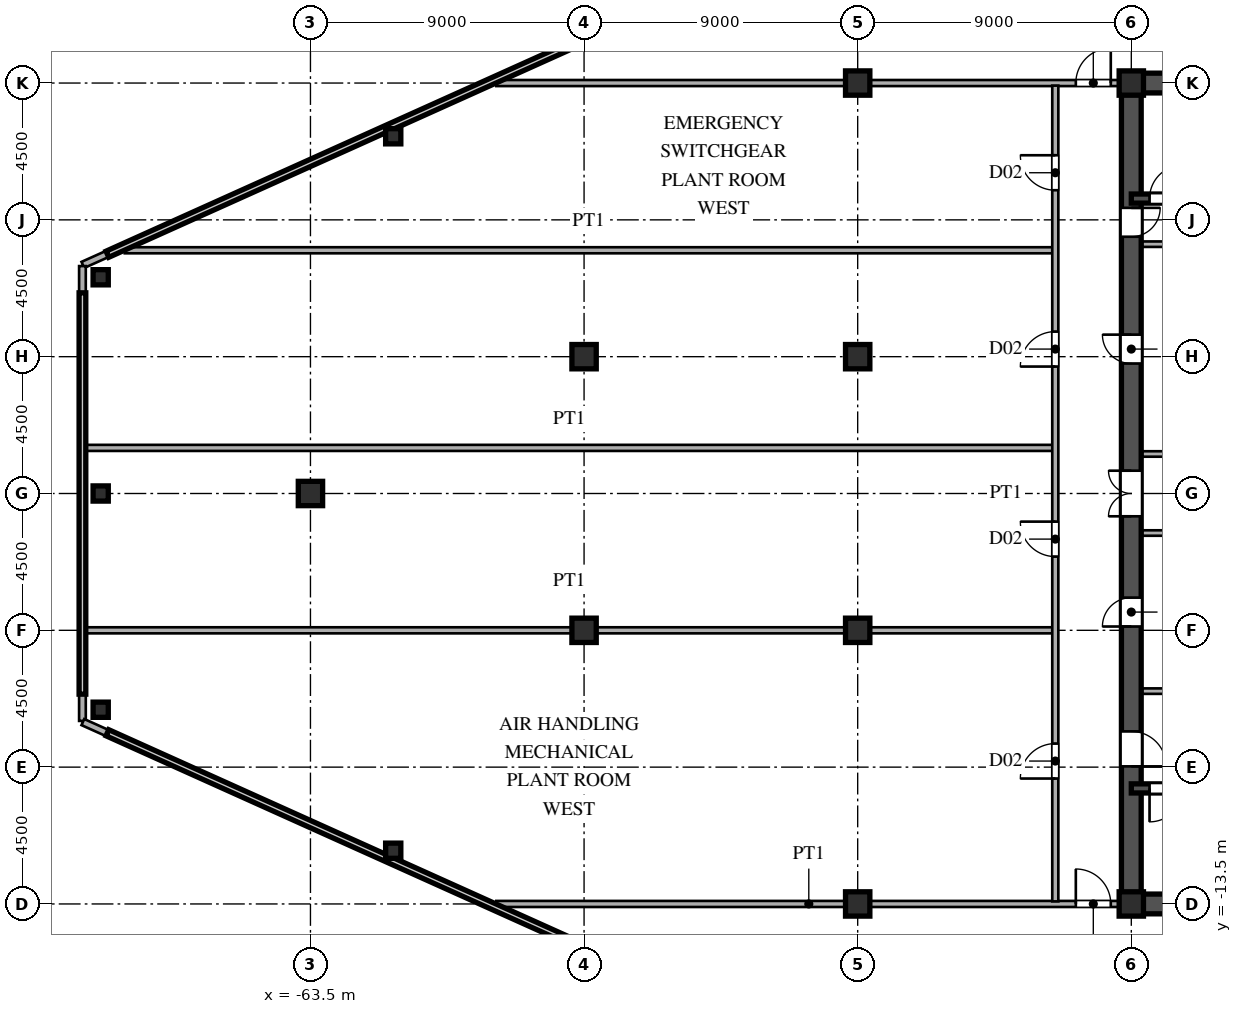
"""IFC4 building model, lengths in metres.
Left out: names, types, materials, properties, quantities, classifications, styles, units other than length and angle.
Written with IfcOpenShell. Run it as: python <this file> out.ifc"""

import sys

from ifc_helpers import new_model, si_unit, direction, frame, frame_2d, origin, origin_2d, place, context, subcontext, project, spatial, rectangle, hollow_rectangle, i_section, extrude, source, transform, mapped, element, fill, save


model = new_model("IFC4")
c1 = context("Model", 3, precision=1e-05, world=origin(), true_north=direction((0.0, 1.0)))
c2 = subcontext(c1, "Body", "Model", "MODEL_VIEW")
j1 = project(units=[si_unit("LENGTHUNIT", "METRE"), si_unit("PLANEANGLEUNIT", "RADIAN")], contexts=[c1])
p1 = place(None, origin())
s1 = spatial("IfcSite", under=j1, at=p1, CompositionType="ELEMENT")
p2 = place(p1, origin())
s2 = spatial("IfcBuilding", under=s1, at=p2, CompositionType="ELEMENT")
p3 = place(p2, frame((0.0, 0.0, 87.3)))
s3 = spatial("IfcBuildingStorey", under=s2, at=p3, CompositionType="ELEMENT", Elevation=87.3)
m1 = source(origin(), c2, "Body", "SweptSolid", [
    extrude(i_section(OverallWidth=0.8, OverallDepth=0.8, WebThickness=0.032, FlangeThickness=0.05, at=origin_2d()), origin(), (0.0, 0.0, 1.0), 5.1),
])
for number, where, z_axis, x_axis in (
    (1, (-36.5, -13.5, 0.0), (0.0, 0.0, 1.0), (1.0, 0.0, 0.0)),
    (2, (-36.5, 13.5, 0.0), (0.0, 0.0, 1.0), (1.0, 0.0, 0.0)),
    (3, (-45.5, -13.5, 0.0), (0.0, 0.0, 1.0), (1.0, 0.0, 0.0)),
    (4, (-45.5, -4.5, 0.0), (0.0, 0.0, 1.0), (1.0, 0.0, 0.0)),
    (5, (-45.5, 4.5, 0.0), (0.0, 0.0, 1.0), (1.0, 0.0, 0.0)),
    (6, (-45.5, 13.5, 0.0), (0.0, 0.0, 1.0), (1.0, 0.0, 0.0)),
    (7, (-54.5, -4.5, 0.0), (0.0, 0.0, 1.0), (1.0, 0.0, 0.0)),
    (8, (-54.5, 4.5, 0.0), (0.0, 0.0, 1.0), (1.0, 0.0, 0.0)),
    (9, (-63.5, 0.0, 0.0), (0.0, 0.0, 1.0), (1.0, 0.0, 0.0)),
):
    element("IfcColumn", number, at=place(p3, frame(where, z_axis=z_axis, x_axis=x_axis)), inside=s3, PredefinedType="COLUMN", context=c2, shape_type="MappedRepresentation", body=[
        mapped(m1, transform((0.0, 0.0, 0.0), scale=1.0)),
    ])
m2 = source(origin(), c2, "Body", "SweptSolid", [
    extrude(hollow_rectangle(XDim=0.5, YDim=0.5, WallThickness=0.02, at=origin_2d()), origin(), (0.0, 0.0, 1.0), 5.1),
])
for number, where, z_axis, x_axis in (
    (10, (-70.4, 7.112, 0.0), (0.0, 0.0, 1.0), (1.0, 0.0, 0.0)),
    (11, (-70.4, -7.112, 0.0), (0.0, 0.0, 1.0), (1.0, 0.0, 0.0)),
    (12, (-60.778, -11.749, 0.0), (0.0, 0.0, 1.0), (1.0, 0.0, 0.0)),
    (13, (-60.778, 11.749, 0.0), (0.0, 0.0, 1.0), (1.0, 0.0, 0.0)),
    (14, (-70.4, 0.0, 0.0), (0.0, 0.0, 1.0), (1.0, 0.0, 0.0)),
):
    element("IfcColumn", number, at=place(p3, frame(where, z_axis=z_axis, x_axis=x_axis)), inside=s3, PredefinedType="COLUMN", context=c2, shape_type="MappedRepresentation", body=[
        mapped(m2, transform((0.0, 0.0, 0.0), scale=1.0)),
    ])
p4 = place(p3, frame((-31.018, 25.492, 0.0), z_axis=(0.0, 0.0, 1.0), x_axis=(-0.911922547569, -0.410362360889, 0.0)))
e15 = element("IfcWall", 15, at=p4, inside=s3, PredefinedType="PARAPET", context=c2, shape_type="SweptSolid", body=[
    extrude(rectangle(XDim=43.823, YDim=0.22, at=frame_2d((21.912, 0.0))), origin(), (0.0, 0.0, 1.0), 1.25),
])
p5 = place(p3, frame((-71.0, 7.48, 0.0), z_axis=(0.0, 0.0, 1.0), x_axis=(0.0, -1.0, 0.0)))
e16 = element("IfcWall", 16, at=p5, inside=s3, PredefinedType="PARAPET", context=c2, shape_type="SweptSolid", body=[
    extrude(rectangle(XDim=14.96, YDim=0.22, at=frame_2d((7.48, 0.0))), origin(), (0.0, 0.0, 1.0), 1.25),
])
p6 = place(p3, frame((-70.982, -7.508, 0.0), z_axis=(0.0, 0.0, 1.0), x_axis=(0.911922547569, -0.410362360889, 0.0)))
e17 = element("IfcWall", 17, at=p6, inside=s3, PredefinedType="PARAPET", context=c2, shape_type="SweptSolid", body=[
    extrude(rectangle(XDim=43.823, YDim=0.22, at=frame_2d((21.912, 0.0))), origin(), (0.0, 0.0, 1.0), 1.25),
])
for number, where, z_axis, x_axis in (
    (18, (-36.5, -13.5, 0.0), (0.0, 0.0, 1.0), (1.0, 0.0, 0.0)),
    (19, (-36.5, 13.5, 0.0), (0.0, 0.0, 1.0), (1.0, 0.0, 0.0)),
):
    element("IfcWall", number, at=place(p3, frame(where, z_axis=z_axis, x_axis=x_axis)), inside=s3, PredefinedType="SHEAR", context=c2, shape_type="SweptSolid", body=[
        extrude(rectangle(XDim=9.0, YDim=0.65, at=frame_2d((4.5, 0.0))), origin(), (0.0, 0.0, 1.0), 4.88),
    ])
p7 = place(p3, frame((-36.5, -13.65, 0.0), z_axis=(0.0, 0.0, 1.0), x_axis=(0.0, 1.0, 0.0)))
e20 = element("IfcWall", 20, at=p7, inside=s3, PredefinedType="SHEAR", context=c2, shape_type="SweptSolid", body=[
    extrude(rectangle(XDim=7.15, YDim=0.65, at=frame_2d((3.575, 0.0))), origin(), (0.0, 0.0, 1.0), 4.88),
])
p8 = place(p7, frame((4.675, 0.0, 0.0)))
e21 = element("IfcOpeningElement", 21, at=p8, cuts=e20, PredefinedType="OPENING", context=c2, shape_type="SweptSolid", body=[
    extrude(rectangle(XDim=1.15, YDim=2.2, at=frame_2d((0.575, 1.1))), frame((0.0, 0.335, 0.0), z_axis=(0.0, -1.0, 0.0), x_axis=(1.0, 0.0, 0.0)), (0.0, 0.0, 1.0), 0.67),
])
p9 = place(p3, frame((-36.5, -1.3, 0.0), z_axis=(0.0, 0.0, 1.0), x_axis=(0.0, 1.0, 0.0)))
e22 = element("IfcWall", 22, at=p9, inside=s3, PredefinedType="SHEAR", context=c2, shape_type="SweptSolid", body=[
    extrude(rectangle(XDim=2.6, YDim=0.65, at=frame_2d((1.3, 0.0))), origin(), (0.0, 0.0, 1.0), 4.88),
])
p10 = place(p9, frame((0.55, 0.0, 0.0)))
e23 = element("IfcOpeningElement", 23, at=p10, cuts=e22, PredefinedType="OPENING", context=c2, shape_type="SweptSolid", body=[
    extrude(rectangle(XDim=1.5, YDim=2.3, at=frame_2d((0.75, 1.15))), frame((0.0, 0.335, 0.0), z_axis=(0.0, -1.0, 0.0), x_axis=(1.0, 0.0, 0.0)), (0.0, 0.0, 1.0), 0.67),
])
p11 = place(p3, frame((-36.5, 8.2, 0.0), z_axis=(0.0, 0.0, 1.0), x_axis=(0.0, 1.0, 0.0)))
e24 = element("IfcWall", 24, at=p11, inside=s3, PredefinedType="SHEAR", context=c2, shape_type="SweptSolid", body=[
    extrude(rectangle(XDim=5.45, YDim=0.65, at=frame_2d((2.725, 0.0))), origin(), (0.0, 0.0, 1.0), 4.88),
])
p12 = place(p11, frame((0.245, 0.0, 0.0)))
e25 = element("IfcOpeningElement", 25, at=p12, cuts=e24, PredefinedType="OPENING", context=c2, shape_type="SweptSolid", body=[
    extrude(rectangle(XDim=0.95, YDim=2.15, at=frame_2d((0.475, 1.075))), frame((0.0, 0.335, 0.0), z_axis=(0.0, -1.0, 0.0), x_axis=(1.0, 0.0, 0.0)), (0.0, 0.0, 1.0), 0.67),
])
p13 = place(p3, frame((-36.5, -6.5, 0.0), z_axis=(0.0, 0.0, 1.0), x_axis=(0.0, 1.0, 0.0)))
e26 = element("IfcWall", 26, at=p13, inside=s3, PredefinedType="SHEAR", context=c2, shape_type="SweptSolid", body=[
    extrude(rectangle(XDim=5.2, YDim=0.65, at=frame_2d((2.6, 0.0))), origin(), (0.0, 0.0, 1.0), 4.88),
])
p14 = place(p13, frame((2.125, 0.0, 0.0)))
e27 = element("IfcOpeningElement", 27, at=p14, cuts=e26, PredefinedType="OPENING", context=c2, shape_type="SweptSolid", body=[
    extrude(rectangle(XDim=0.95, YDim=2.15, at=frame_2d((0.475, 1.075))), frame((0.0, 0.335, 0.0), z_axis=(0.0, -1.0, 0.0), x_axis=(1.0, 0.0, 0.0)), (0.0, 0.0, 1.0), 0.67),
])
p15 = place(p3, frame((-36.5, 1.3, 0.0), z_axis=(0.0, 0.0, 1.0), x_axis=(0.0, 1.0, 0.0)))
e28 = element("IfcWall", 28, at=p15, inside=s3, PredefinedType="SHEAR", context=c2, shape_type="SweptSolid", body=[
    extrude(rectangle(XDim=6.9, YDim=0.65, at=frame_2d((3.45, 0.0))), origin(), (0.0, 0.0, 1.0), 4.88),
])
p16 = place(p15, frame((2.975, 0.0, 0.0)))
e29 = element("IfcOpeningElement", 29, at=p16, cuts=e28, PredefinedType="OPENING", context=c2, shape_type="SweptSolid", body=[
    extrude(rectangle(XDim=0.95, YDim=2.15, at=frame_2d((0.475, 1.075))), frame((0.0, 0.335, 0.0), z_axis=(0.0, -1.0, 0.0), x_axis=(1.0, 0.0, 0.0)), (0.0, 0.0, 1.0), 0.67),
])
p17 = place(p3, frame((-36.5, -9.7, 0.0), z_axis=(0.0, 0.0, 1.0), x_axis=(1.0, 0.0, 0.0)))
e30 = element("IfcWall", 30, at=p17, inside=s3, PredefinedType="SHEAR", context=c2, shape_type="SweptSolid", body=[
    extrude(rectangle(XDim=9.0, YDim=0.3, at=frame_2d((4.5, 0.0))), origin(), (0.0, 0.0, 1.0), 4.88),
])
p18 = place(p17, frame((0.6, 0.0, 0.0)))
e31 = element("IfcOpeningElement", 31, at=p18, cuts=e30, PredefinedType="OPENING", context=c2, shape_type="SweptSolid", body=[
    extrude(rectangle(XDim=1.1, YDim=2.2, at=frame_2d((0.55, 1.1))), frame((0.0, 0.16, 0.0), z_axis=(0.0, -1.0, 0.0), x_axis=(1.0, 0.0, 0.0)), (0.0, 0.0, 1.0), 0.32),
])
p19 = place(p3, frame((-36.5, 9.7, 0.0), z_axis=(0.0, 0.0, 1.0), x_axis=(1.0, 0.0, 0.0)))
e32 = element("IfcWall", 32, at=p19, inside=s3, PredefinedType="SHEAR", context=c2, shape_type="SweptSolid", body=[
    extrude(rectangle(XDim=9.0, YDim=0.3, at=frame_2d((4.5, 0.0))), origin(), (0.0, 0.0, 1.0), 4.88),
])
p20 = place(p19, frame((0.6, 0.0, 0.0)))
e33 = element("IfcOpeningElement", 33, at=p20, cuts=e32, PredefinedType="OPENING", context=c2, shape_type="SweptSolid", body=[
    extrude(rectangle(XDim=1.1, YDim=2.2, at=frame_2d((0.55, 1.1))), frame((0.0, 0.16, 0.0), z_axis=(0.0, -1.0, 0.0), x_axis=(1.0, 0.0, 0.0)), (0.0, 0.0, 1.0), 0.32),
])
for number, where, z_axis, x_axis in (
    (34, (-36.15, -6.5, 0.0), (0.0, 0.0, 1.0), (1.0, 0.0, 0.0)),
    (35, (-36.15, 8.2, 0.0), (0.0, 0.0, 1.0), (1.0, 0.0, 0.0)),
):
    element("IfcWall", number, at=place(p3, frame(where, z_axis=z_axis, x_axis=x_axis)), inside=s3, PredefinedType="PARTITIONING", context=c2, shape_type="SweptSolid", body=[
        extrude(rectangle(XDim=5.7, YDim=0.18, at=frame_2d((2.85, 0.0))), origin(), (0.0, 0.0, 1.0), 4.88),
    ])
for number, where, z_axis, x_axis in (
    (36, (-36.15, -1.3, 0.0), (0.0, 0.0, 1.0), (1.0, 0.0, 0.0)),
    (37, (-36.15, 1.3, 0.0), (0.0, 0.0, 1.0), (1.0, 0.0, 0.0)),
):
    element("IfcWall", number, at=place(p3, frame(where, z_axis=z_axis, x_axis=x_axis)), inside=s3, PredefinedType="PARTITIONING", context=c2, shape_type="SweptSolid", body=[
        extrude(rectangle(XDim=2.95, YDim=0.18, at=frame_2d((1.475, 0.0))), origin(), (0.0, 0.0, 1.0), 4.88),
    ])
p21 = place(p3, frame((-57.386, -13.5, 0.0), z_axis=(0.0, 0.0, 1.0), x_axis=(1.0, 0.0, 0.0)))
e38 = element("IfcWall", 38, at=p21, inside=s3, PredefinedType="PARTITIONING", context=c2, shape_type="SweptSolid", body=[
    extrude(rectangle(XDim=11.866, YDim=0.2, at=frame_2d((5.933, 0.0))), origin(), (0.0, 0.0, 1.0), 4.88),
])
p22 = place(p3, frame((-45.52, -13.5, 0.0), z_axis=(0.0, 0.0, 1.0), x_axis=(1.0, 0.0, 0.0)))
e39 = element("IfcWall", 39, at=p22, inside=s3, PredefinedType="PARTITIONING", context=c2, shape_type="SweptSolid", body=[
    extrude(rectangle(XDim=8.69, YDim=0.2, at=frame_2d((4.345, 0.0))), origin(), (0.0, 0.0, 1.0), 4.18),
])
p23 = place(p22, frame((7.195, 0.0, 0.0)))
e40 = element("IfcOpeningElement", 40, at=p23, cuts=e39, PredefinedType="OPENING", context=c2, shape_type="SweptSolid", body=[
    extrude(rectangle(XDim=1.15, YDim=2.2, at=frame_2d((0.575, 1.1))), frame((0.0, 0.11, 0.0), z_axis=(0.0, -1.0, 0.0), x_axis=(1.0, 0.0, 0.0)), (0.0, 0.0, 1.0), 0.22),
])
p24 = place(p3, frame((-70.885, -4.5, 0.0), z_axis=(0.0, 0.0, 1.0), x_axis=(1.0, 0.0, 0.0)))
e41 = element("IfcWall", 41, at=p24, inside=s3, PredefinedType="PARTITIONING", context=c2, shape_type="SweptSolid", body=[
    extrude(rectangle(XDim=16.365, YDim=0.2, at=frame_2d((8.183, 0.0))), origin(), (0.0, 0.0, 1.0), 4.88),
])
p25 = place(p3, frame((-54.52, -4.5, 0.0), z_axis=(0.0, 0.0, 1.0), x_axis=(1.0, 0.0, 0.0)))
e42 = element("IfcWall", 42, at=p25, inside=s3, PredefinedType="PARTITIONING", context=c2, shape_type="SweptSolid", body=[
    extrude(rectangle(XDim=15.435, YDim=0.2, at=frame_2d((7.718, 0.0))), origin(), (0.0, 0.0, 1.0), 4.18),
])
p26 = place(p3, frame((-70.885, 1.5, 0.0), z_axis=(0.0, 0.0, 1.0), x_axis=(1.0, 0.0, 0.0)))
e43 = element("IfcWall", 43, at=p26, inside=s3, PredefinedType="PARTITIONING", context=c2, shape_type="SweptSolid", body=[
    extrude(rectangle(XDim=31.8, YDim=0.2, at=frame_2d((15.9, 0.0))), origin(), (0.0, 0.0, 1.0), 4.88),
])
p27 = place(p3, frame((-69.609, 8.0, 0.0), z_axis=(0.0, 0.0, 1.0), x_axis=(1.0, 0.0, 0.0)))
e44 = element("IfcWall", 44, at=p27, inside=s3, PredefinedType="PARTITIONING", context=c2, shape_type="SweptSolid", body=[
    extrude(rectangle(XDim=30.524, YDim=0.2, at=frame_2d((15.262, 0.0))), origin(), (0.0, 0.0, 1.0), 4.88),
])
p28 = place(p3, frame((-57.386, 13.5, 0.0), z_axis=(0.0, 0.0, 1.0), x_axis=(1.0, 0.0, 0.0)))
e45 = element("IfcWall", 45, at=p28, inside=s3, PredefinedType="PARTITIONING", context=c2, shape_type="SweptSolid", body=[
    extrude(rectangle(XDim=11.866, YDim=0.2, at=frame_2d((5.933, 0.0))), origin(), (0.0, 0.0, 1.0), 4.88),
])
p29 = place(p3, frame((-45.52, 13.5, 0.0), z_axis=(0.0, 0.0, 1.0), x_axis=(1.0, 0.0, 0.0)))
e46 = element("IfcWall", 46, at=p29, inside=s3, PredefinedType="PARTITIONING", context=c2, shape_type="SweptSolid", body=[
    extrude(rectangle(XDim=8.69, YDim=0.2, at=frame_2d((4.345, 0.0))), origin(), (0.0, 0.0, 1.0), 4.18),
])
p30 = place(p29, frame((7.195, 0.0, 0.0)))
e47 = element("IfcOpeningElement", 47, at=p30, cuts=e46, PredefinedType="OPENING", context=c2, shape_type="SweptSolid", body=[
    extrude(rectangle(XDim=1.15, YDim=2.2, at=frame_2d((0.575, 1.1))), frame((0.0, 0.11, 0.0), z_axis=(0.0, -1.0, 0.0), x_axis=(1.0, 0.0, 0.0)), (0.0, 0.0, 1.0), 0.22),
])
p31 = place(p3, frame((-39.0, -13.415, 0.0), z_axis=(0.0, 0.0, 1.0), x_axis=(0.0, 1.0, 0.0)))
e48 = element("IfcWall", 48, at=p31, inside=s3, PredefinedType="PARTITIONING", context=c2, shape_type="SweptSolid", body=[
    extrude(rectangle(XDim=26.83, YDim=0.2, at=frame_2d((13.415, 0.0))), origin(), (0.0, 0.0, 1.0), 4.88),
])
p32 = place(p31, frame((4.04, 0.0, 0.0)))
e49 = element("IfcOpeningElement", 49, at=p32, cuts=e48, PredefinedType="OPENING", context=c2, shape_type="SweptSolid", body=[
    extrude(rectangle(XDim=1.15, YDim=2.2, at=frame_2d((0.575, 1.1))), frame((0.0, 0.11, 0.0), z_axis=(0.0, -1.0, 0.0), x_axis=(1.0, 0.0, 0.0)), (0.0, 0.0, 1.0), 0.22),
])
p33 = place(p31, frame((11.34, 0.0, 0.0)))
e50 = element("IfcOpeningElement", 50, at=p33, cuts=e48, PredefinedType="OPENING", context=c2, shape_type="SweptSolid", body=[
    extrude(rectangle(XDim=1.15, YDim=2.2, at=frame_2d((0.575, 1.1))), frame((0.0, 0.11, 0.0), z_axis=(0.0, -1.0, 0.0), x_axis=(1.0, 0.0, 0.0)), (0.0, 0.0, 1.0), 0.22),
])
p34 = place(p31, frame((17.59, 0.0, 0.0)))
e51 = element("IfcOpeningElement", 51, at=p34, cuts=e48, PredefinedType="OPENING", context=c2, shape_type="SweptSolid", body=[
    extrude(rectangle(XDim=1.15, YDim=2.2, at=frame_2d((0.575, 1.1))), frame((0.0, 0.11, 0.0), z_axis=(0.0, -1.0, 0.0), x_axis=(1.0, 0.0, 0.0)), (0.0, 0.0, 1.0), 0.22),
])
p35 = place(p31, frame((23.39, 0.0, 0.0)))
e52 = element("IfcOpeningElement", 52, at=p35, cuts=e48, PredefinedType="OPENING", context=c2, shape_type="SweptSolid", body=[
    extrude(rectangle(XDim=1.15, YDim=2.2, at=frame_2d((0.575, 1.1))), frame((0.0, 0.11, 0.0), z_axis=(0.0, -1.0, 0.0), x_axis=(1.0, 0.0, 0.0)), (0.0, 0.0, 1.0), 0.22),
])
m3 = source(origin(), c2, "Body", "SweptSolid", [
    extrude(rectangle(XDim=1.15, YDim=2.2, at=frame_2d((0.575, 1.1))), frame((0.0, 0.025, 0.0), z_axis=(0.0, -1.0, 0.0), x_axis=(1.0, 0.0, 0.0)), (0.0, 0.0, 1.0), 0.05),
])
p36 = place(p8, frame((1.15, 0.0, 0.0), z_axis=(0.0, 0.0, 1.0), x_axis=(-1.0, 0.0, 0.0)))
e53 = element("IfcDoor", 53, at=p36, inside=s3, OperationType="SINGLE_SWING_LEFT", PredefinedType="DOOR", context=c2, shape_type="MappedRepresentation", body=[
    mapped(m3, transform((0.0, 0.0, 0.0), scale=1.0)),
])
fill(e21, e53)
m4 = source(origin(), c2, "Body", "SweptSolid", [
    extrude(rectangle(XDim=1.5, YDim=2.3, at=frame_2d((0.75, 1.15))), frame((0.0, 0.025, 0.0), z_axis=(0.0, -1.0, 0.0), x_axis=(1.0, 0.0, 0.0)), (0.0, 0.0, 1.0), 0.05),
])
p37 = place(p10, origin())
e54 = element("IfcDoor", 54, at=p37, inside=s3, OperationType="DOUBLE_SWING_LEFT", PredefinedType="DOOR", context=c2, shape_type="MappedRepresentation", body=[
    mapped(m4, transform((0.0, 0.0, 0.0), scale=1.0)),
])
fill(e23, e54)
m5 = source(origin(), c2, "Body", "SweptSolid", [
    extrude(rectangle(XDim=0.95, YDim=2.15, at=frame_2d((0.475, 1.075))), frame((0.0, 0.025, 0.0), z_axis=(0.0, -1.0, 0.0), x_axis=(1.0, 0.0, 0.0)), (0.0, 0.0, 1.0), 0.05),
])
p38 = place(p12, frame((0.95, 0.0, 0.0), z_axis=(0.0, 0.0, 1.0), x_axis=(-1.0, 0.0, 0.0)))
e55 = element("IfcDoor", 55, at=p38, inside=s3, OperationType="SINGLE_SWING_RIGHT", PredefinedType="DOOR", context=c2, shape_type="MappedRepresentation", body=[
    mapped(m5, transform((0.0, 0.0, 0.0), scale=1.0)),
])
fill(e25, e55)
p39 = place(p14, origin())
e56 = element("IfcDoor", 56, at=p39, inside=s3, OperationType="SINGLE_SWING_LEFT", PredefinedType="DOOR", context=c2, shape_type="MappedRepresentation", body=[
    mapped(m5, transform((0.0, 0.0, 0.0), scale=1.0)),
])
fill(e27, e56)
p40 = place(p16, origin())
e57 = element("IfcDoor", 57, at=p40, inside=s3, OperationType="SINGLE_SWING_RIGHT", PredefinedType="DOOR", context=c2, shape_type="MappedRepresentation", body=[
    mapped(m5, transform((0.0, 0.0, 0.0), scale=1.0)),
])
fill(e29, e57)
m6 = source(origin(), c2, "Body", "SweptSolid", [
    extrude(rectangle(XDim=1.1, YDim=2.2, at=frame_2d((0.55, 1.1))), frame((0.0, 0.025, 0.0), z_axis=(0.0, -1.0, 0.0), x_axis=(1.0, 0.0, 0.0)), (0.0, 0.0, 1.0), 0.05),
])
p41 = place(p18, frame((1.1, 0.0, 0.0), z_axis=(0.0, 0.0, 1.0), x_axis=(-1.0, 0.0, 0.0)))
e58 = element("IfcDoor", 58, at=p41, inside=s3, OperationType="SINGLE_SWING_LEFT", PredefinedType="DOOR", context=c2, shape_type="MappedRepresentation", body=[
    mapped(m6, transform((0.0, 0.0, 0.0), scale=1.0)),
])
fill(e31, e58)
p42 = place(p20, origin())
e59 = element("IfcDoor", 59, at=p42, inside=s3, OperationType="SINGLE_SWING_RIGHT", PredefinedType="DOOR", context=c2, shape_type="MappedRepresentation", body=[
    mapped(m6, transform((0.0, 0.0, 0.0), scale=1.0)),
])
fill(e33, e59)
p43 = place(p23, origin())
e60 = element("IfcDoor", 60, at=p43, inside=s3, OperationType="SINGLE_SWING_LEFT", PredefinedType="DOOR", context=c2, shape_type="MappedRepresentation", body=[
    mapped(m3, transform((0.0, 0.0, 0.0), scale=1.0)),
])
fill(e40, e60)
p44 = place(p30, origin())
e61 = element("IfcDoor", 61, at=p44, inside=s3, OperationType="SINGLE_SWING_RIGHT", PredefinedType="DOOR", context=c2, shape_type="MappedRepresentation", body=[
    mapped(m3, transform((0.0, 0.0, 0.0), scale=1.0)),
])
fill(e47, e61)
p45 = place(p32, origin())
e62 = element("IfcDoor", 62, at=p45, inside=s3, OperationType="SINGLE_SWING_LEFT", PredefinedType="DOOR", context=c2, shape_type="MappedRepresentation", body=[
    mapped(m3, transform((0.0, 0.0, 0.0), scale=1.0)),
])
fill(e49, e62)
p46 = place(p33, origin())
e63 = element("IfcDoor", 63, at=p46, inside=s3, OperationType="SINGLE_SWING_RIGHT", PredefinedType="DOOR", context=c2, shape_type="MappedRepresentation", body=[
    mapped(m3, transform((0.0, 0.0, 0.0), scale=1.0)),
])
fill(e50, e63)
p47 = place(p34, origin())
e64 = element("IfcDoor", 64, at=p47, inside=s3, OperationType="SINGLE_SWING_LEFT", PredefinedType="DOOR", context=c2, shape_type="MappedRepresentation", body=[
    mapped(m3, transform((0.0, 0.0, 0.0), scale=1.0)),
])
fill(e51, e64)
p48 = place(p35, origin())
e65 = element("IfcDoor", 65, at=p48, inside=s3, OperationType="SINGLE_SWING_RIGHT", PredefinedType="DOOR", context=c2, shape_type="MappedRepresentation", body=[
    mapped(m3, transform((0.0, 0.0, 0.0), scale=1.0)),
])
fill(e52, e65)
save(model, sys.argv[1])
